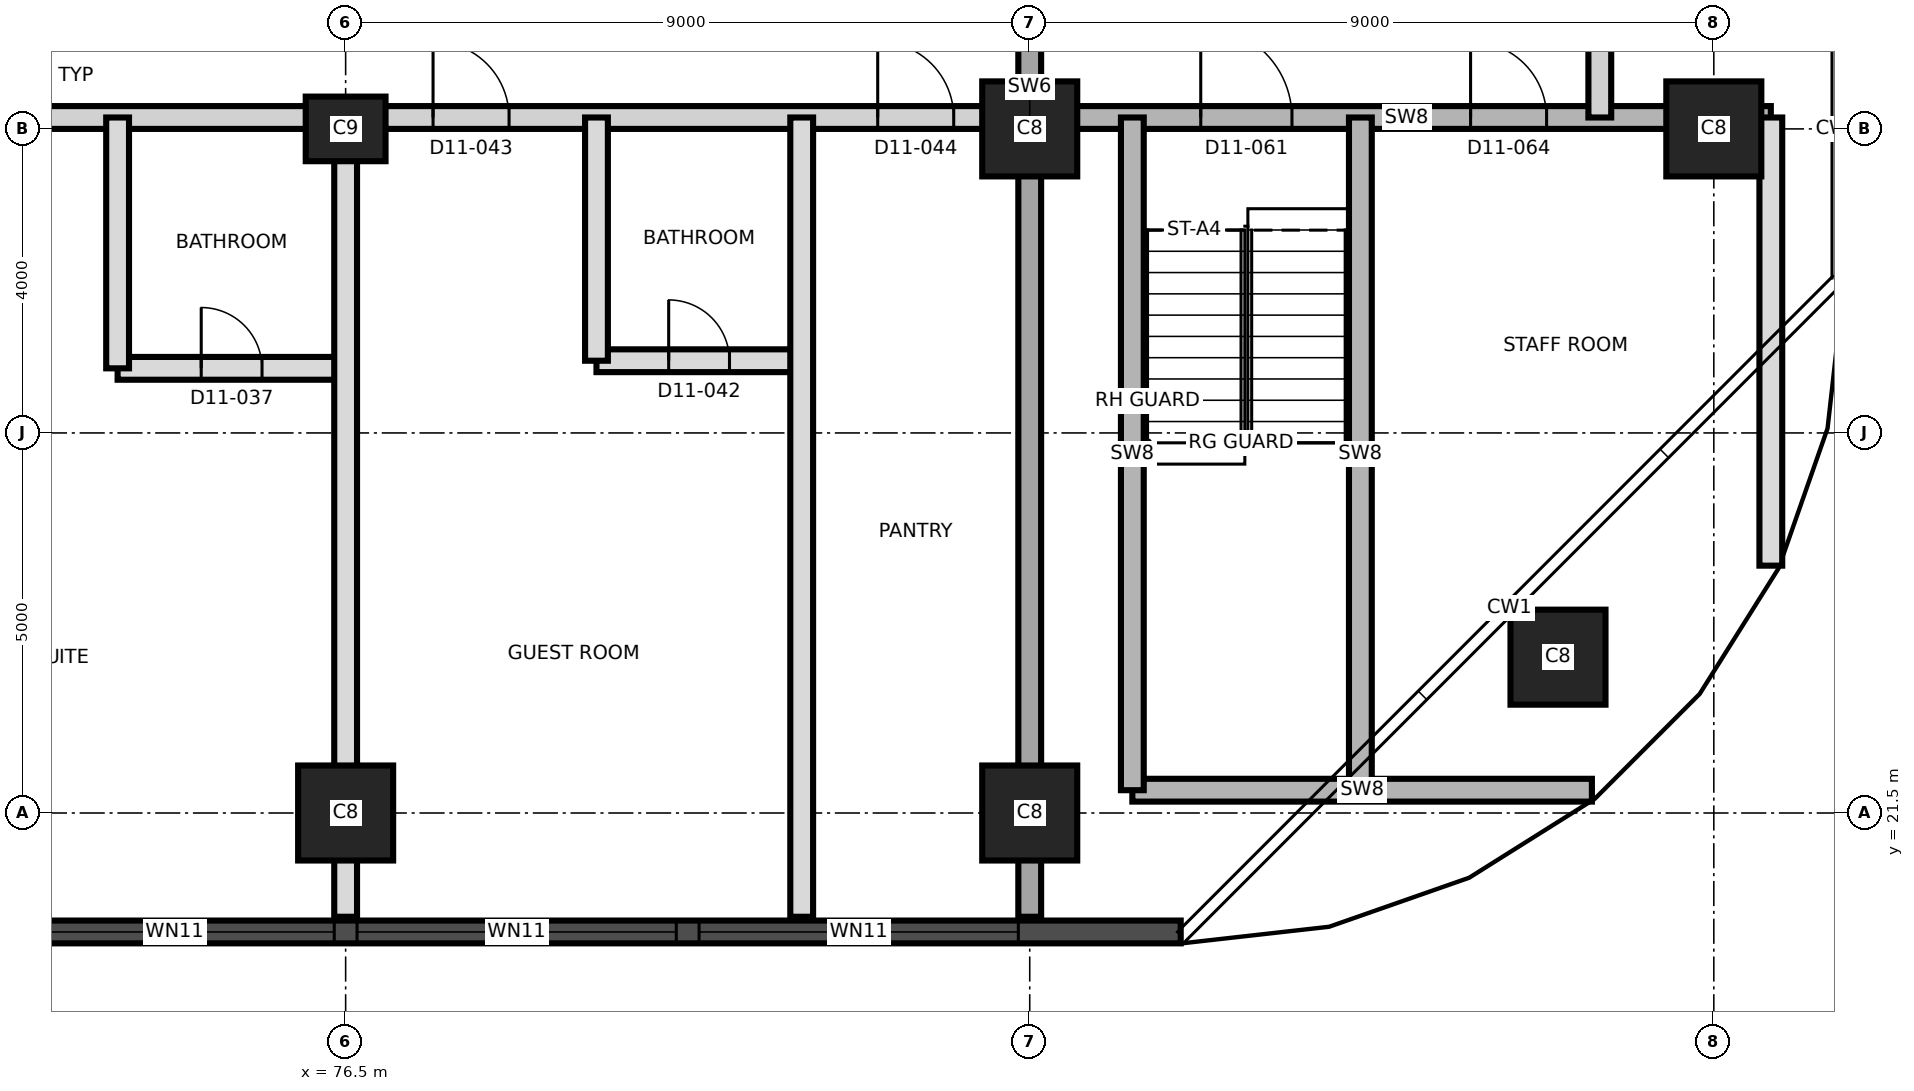
"""IFC4 building model, lengths in metres.
Left out: names, types, materials, properties, quantities, classifications, styles, units other than length and angle.
Written with IfcOpenShell. Run it as: python <this file> out.ifc"""

import sys

from ifc_helpers import new_model, si_unit, direction, frame, frame_2d, origin, origin_2d, place, context, subcontext, project, spatial, rectangle, extrude, element, fill, save


model = new_model("IFC4")
c1 = context("Model", 3, precision=1e-05, world=origin(), true_north=direction((0.0, 1.0)))
c2 = subcontext(c1, "Body", "Model", "MODEL_VIEW")
j1 = project(units=[si_unit("LENGTHUNIT", "METRE"), si_unit("PLANEANGLEUNIT", "RADIAN")], contexts=[c1])
p1 = place(None, origin())
s1 = spatial("IfcSite", under=j1, at=p1, CompositionType="ELEMENT")
p2 = place(p1, origin())
s2 = spatial("IfcBuilding", under=s1, at=p2, CompositionType="ELEMENT")
p3 = place(p2, frame((0.0, 0.0, 131.5)))
s3 = spatial("IfcBuildingStorey", under=s2, at=p3, CompositionType="ELEMENT", Elevation=131.5)
for number, where, z_axis, x_axis in (
    (1, (76.5, 21.5, 0.0), (0.0, 0.0, 1.0), (1.0, 0.0, 0.0)),
    (2, (85.5, 21.5, 0.0), (0.0, 0.0, 1.0), (1.0, 0.0, 0.0)),
    (3, (92.45, 23.55, 0.0), (0.0, 0.0, 1.0), (1.0, 0.0, 0.0)),
):
    element("IfcColumn", number, at=place(p3, frame(where, z_axis=z_axis, x_axis=x_axis)), inside=s3, PredefinedType="COLUMN", context=c2, shape_type="SweptSolid", body=[
        extrude(rectangle(XDim=1.25, YDim=1.25, at=origin_2d()), origin(), (0.0, 0.0, 1.0), 3.7),
    ])
p4 = place(p3, frame((76.5, 30.5, 0.0), z_axis=(0.0, 0.0, 1.0), x_axis=(1.0, 0.0, 0.0)))
e4 = element("IfcColumn", 4, at=p4, inside=s3, PredefinedType="COLUMN", context=c2, shape_type="SweptSolid", body=[
    extrude(rectangle(XDim=1.05, YDim=0.85, at=origin_2d()), origin(), (0.0, 0.0, 1.0), 3.7),
])
for number, where, z_axis, x_axis in (
    (5, (85.5, 30.5, 0.0), (0.0, 0.0, 1.0), (1.0, 0.0, 0.0)),
    (6, (94.5, 30.5, 0.0), (0.0, 0.0, 1.0), (1.0, 0.0, 0.0)),
):
    element("IfcColumn", number, at=place(p3, frame(where, z_axis=z_axis, x_axis=x_axis)), inside=s3, PredefinedType="COLUMN", context=c2, shape_type="SweptSolid", body=[
        extrude(rectangle(XDim=1.25, YDim=1.25, at=origin_2d()), origin(), (0.0, 0.0, 1.0), 3.7),
    ])
p5 = place(p3, frame((85.5, 20.135, 0.0), z_axis=(0.0, 0.0, 1.0), x_axis=(0.0, 1.0, 0.0)))
e7 = element("IfcWall", 7, at=p5, inside=s3, PredefinedType="SHEAR", context=c2, shape_type="SweptSolid", body=[
    extrude(rectangle(XDim=20.73, YDim=0.3, at=frame_2d((10.365, 0.0))), origin(), (0.0, 0.0, 1.0), 3.7),
])
p6 = place(p5, frame((11.565, 0.0, 0.0)))
e8 = element("IfcOpeningElement", 8, at=p6, cuts=e7, PredefinedType="OPENING", context=c2, shape_type="SweptSolid", body=[
    extrude(rectangle(XDim=1.4, YDim=2.1, at=frame_2d((0.7, 1.05))), frame((0.0, 0.16, 0.0), z_axis=(0.0, -1.0, 0.0), x_axis=(1.0, 0.0, 0.0)), (0.0, 0.0, 1.0), 0.32),
])
p7 = place(p3, frame((44.01, 19.935, 0.0), z_axis=(0.0, 0.0, 1.0), x_axis=(1.0, 0.0, 0.0)))
e9 = element("IfcWall", 9, at=p7, inside=s3, PredefinedType="SOLIDWALL", context=c2, shape_type="SweptSolid", body=[
    extrude(rectangle(XDim=43.477, YDim=0.3, at=frame_2d((21.738, 0.0))), origin(), (0.0, 0.0, 1.0), 3.4),
])
p8 = place(p7, frame((1.845, 0.0, 0.3)))
e10 = element("IfcOpeningElement", 10, at=p8, cuts=e9, PredefinedType="OPENING", context=c2, shape_type="SweptSolid", body=[
    extrude(rectangle(XDim=1.8, YDim=2.4, at=frame_2d((0.9, 1.2))), frame((0.0, 0.16, 0.0), z_axis=(0.0, -1.0, 0.0), x_axis=(1.0, 0.0, 0.0)), (0.0, 0.0, 1.0), 0.32),
])
p9 = place(p7, frame((5.64, 0.0, 0.9)))
e11 = element("IfcOpeningElement", 11, at=p9, cuts=e9, PredefinedType="OPENING", context=c2, shape_type="SweptSolid", body=[
    extrude(rectangle(XDim=4.2, YDim=1.5, at=frame_2d((2.1, 0.75))), frame((0.0, 0.16, 0.0), z_axis=(0.0, -1.0, 0.0), x_axis=(1.0, 0.0, 0.0)), (0.0, 0.0, 1.0), 0.32),
])
p10 = place(p7, frame((10.14, 0.0, 0.9)))
e12 = element("IfcOpeningElement", 12, at=p10, cuts=e9, PredefinedType="OPENING", context=c2, shape_type="SweptSolid", body=[
    extrude(rectangle(XDim=4.2, YDim=1.5, at=frame_2d((2.1, 0.75))), frame((0.0, 0.16, 0.0), z_axis=(0.0, -1.0, 0.0), x_axis=(1.0, 0.0, 0.0)), (0.0, 0.0, 1.0), 0.32),
])
p11 = place(p7, frame((14.64, 0.0, 0.9)))
e13 = element("IfcOpeningElement", 13, at=p11, cuts=e9, PredefinedType="OPENING", context=c2, shape_type="SweptSolid", body=[
    extrude(rectangle(XDim=4.2, YDim=1.5, at=frame_2d((2.1, 0.75))), frame((0.0, 0.16, 0.0), z_axis=(0.0, -1.0, 0.0), x_axis=(1.0, 0.0, 0.0)), (0.0, 0.0, 1.0), 0.32),
])
p12 = place(p7, frame((19.14, 0.0, 0.9)))
e14 = element("IfcOpeningElement", 14, at=p12, cuts=e9, PredefinedType="OPENING", context=c2, shape_type="SweptSolid", body=[
    extrude(rectangle(XDim=4.2, YDim=1.5, at=frame_2d((2.1, 0.75))), frame((0.0, 0.16, 0.0), z_axis=(0.0, -1.0, 0.0), x_axis=(1.0, 0.0, 0.0)), (0.0, 0.0, 1.0), 0.32),
])
p13 = place(p7, frame((23.64, 0.0, 0.9)))
e15 = element("IfcOpeningElement", 15, at=p13, cuts=e9, PredefinedType="OPENING", context=c2, shape_type="SweptSolid", body=[
    extrude(rectangle(XDim=4.2, YDim=1.5, at=frame_2d((2.1, 0.75))), frame((0.0, 0.16, 0.0), z_axis=(0.0, -1.0, 0.0), x_axis=(1.0, 0.0, 0.0)), (0.0, 0.0, 1.0), 0.32),
])
p14 = place(p7, frame((28.14, 0.0, 0.9)))
e16 = element("IfcOpeningElement", 16, at=p14, cuts=e9, PredefinedType="OPENING", context=c2, shape_type="SweptSolid", body=[
    extrude(rectangle(XDim=4.2, YDim=1.5, at=frame_2d((2.1, 0.75))), frame((0.0, 0.16, 0.0), z_axis=(0.0, -1.0, 0.0), x_axis=(1.0, 0.0, 0.0)), (0.0, 0.0, 1.0), 0.32),
])
p15 = place(p7, frame((32.64, 0.0, 0.9)))
e17 = element("IfcOpeningElement", 17, at=p15, cuts=e9, PredefinedType="OPENING", context=c2, shape_type="SweptSolid", body=[
    extrude(rectangle(XDim=4.2, YDim=1.5, at=frame_2d((2.1, 0.75))), frame((0.0, 0.16, 0.0), z_axis=(0.0, -1.0, 0.0), x_axis=(1.0, 0.0, 0.0)), (0.0, 0.0, 1.0), 0.32),
])
p16 = place(p7, frame((37.14, 0.0, 0.9)))
e18 = element("IfcOpeningElement", 18, at=p16, cuts=e9, PredefinedType="OPENING", context=c2, shape_type="SweptSolid", body=[
    extrude(rectangle(XDim=4.2, YDim=1.5, at=frame_2d((2.1, 0.75))), frame((0.0, 0.16, 0.0), z_axis=(0.0, -1.0, 0.0), x_axis=(1.0, 0.0, 0.0)), (0.0, 0.0, 1.0), 0.32),
])
p17 = place(p3, frame((86.85, 21.8, 0.0), z_axis=(0.0, 0.0, 1.0), x_axis=(1.0, 0.0, 0.0)))
e19 = element("IfcWall", 19, at=p17, inside=s3, PredefinedType="SHEAR", context=c2, shape_type="SweptSolid", body=[
    extrude(rectangle(XDim=6.046, YDim=0.3, at=frame_2d((3.023, 0.0))), origin(), (0.0, 0.0, 1.0), 3.4),
])
p18 = place(p3, frame((73.5, 27.35, 0.0), z_axis=(0.0, 0.0, 1.0), x_axis=(1.0, 0.0, 0.0)))
e20 = element("IfcWall", 20, at=p18, inside=s3, PredefinedType="PARTITIONING", context=c2, shape_type="SweptSolid", body=[
    extrude(rectangle(XDim=3.0, YDim=0.3, at=frame_2d((1.5, 0.0))), origin(), (0.0, 0.0, 1.0), 3.4),
])
p19 = place(p18, frame((1.1, 0.0, 0.0)))
e21 = element("IfcOpeningElement", 21, at=p19, cuts=e20, PredefinedType="OPENING", context=c2, shape_type="SweptSolid", body=[
    extrude(rectangle(XDim=0.8, YDim=2.1, at=frame_2d((0.4, 1.05))), frame((0.0, 0.16, 0.0), z_axis=(0.0, -1.0, 0.0), x_axis=(1.0, 0.0, 0.0)), (0.0, 0.0, 1.0), 0.32),
])
p20 = place(p3, frame((79.8, 27.45, 0.0), z_axis=(0.0, 0.0, 1.0), x_axis=(1.0, 0.0, 0.0)))
e22 = element("IfcWall", 22, at=p20, inside=s3, PredefinedType="PARTITIONING", context=c2, shape_type="SweptSolid", body=[
    extrude(rectangle(XDim=2.7, YDim=0.3, at=frame_2d((1.35, 0.0))), origin(), (0.0, 0.0, 1.0), 3.4),
])
p21 = place(p20, frame((0.95, 0.0, 0.0)))
e23 = element("IfcOpeningElement", 23, at=p21, cuts=e22, PredefinedType="OPENING", context=c2, shape_type="SweptSolid", body=[
    extrude(rectangle(XDim=0.8, YDim=2.1, at=frame_2d((0.4, 1.05))), frame((0.0, 0.16, 0.0), z_axis=(0.0, -1.0, 0.0), x_axis=(1.0, 0.0, 0.0)), (0.0, 0.0, 1.0), 0.32),
])
p22 = place(p3, frame((58.8, 30.65, 0.0), z_axis=(0.0, 0.0, 1.0), x_axis=(1.0, 0.0, 0.0)))
e24 = element("IfcWall", 24, at=p22, inside=s3, PredefinedType="PARTITIONING", context=c2, shape_type="SweptSolid", body=[
    extrude(rectangle(XDim=26.53, YDim=0.3, at=frame_2d((13.265, 0.0))), origin(), (0.0, 0.0, 1.0), 3.4),
])
p23 = place(p22, frame((3.115, 0.0, 0.0)))
e25 = element("IfcOpeningElement", 25, at=p23, cuts=e24, PredefinedType="OPENING", context=c2, shape_type="SweptSolid", body=[
    extrude(rectangle(XDim=1.0, YDim=2.1, at=frame_2d((0.5, 1.05))), frame((0.0, 0.16, 0.0), z_axis=(0.0, -1.0, 0.0), x_axis=(1.0, 0.0, 0.0)), (0.0, 0.0, 1.0), 0.32),
])
p24 = place(p22, frame((6.065, 0.0, 0.0)))
e26 = element("IfcOpeningElement", 26, at=p24, cuts=e24, PredefinedType="OPENING", context=c2, shape_type="SweptSolid", body=[
    extrude(rectangle(XDim=1.4, YDim=2.1, at=frame_2d((0.7, 1.05))), frame((0.0, 0.16, 0.0), z_axis=(0.0, -1.0, 0.0), x_axis=(1.0, 0.0, 0.0)), (0.0, 0.0, 1.0), 0.32),
])
p25 = place(p22, frame((12.7, 0.0, 0.0)))
e27 = element("IfcOpeningElement", 27, at=p25, cuts=e24, PredefinedType="OPENING", context=c2, shape_type="SweptSolid", body=[
    extrude(rectangle(XDim=1.0, YDim=2.4, at=frame_2d((0.5, 1.2))), frame((0.0, 0.16, 0.0), z_axis=(0.0, -1.0, 0.0), x_axis=(1.0, 0.0, 0.0)), (0.0, 0.0, 1.0), 0.32),
])
p26 = place(p22, frame((18.85, 0.0, 0.0)))
e28 = element("IfcOpeningElement", 28, at=p26, cuts=e24, PredefinedType="OPENING", context=c2, shape_type="SweptSolid", body=[
    extrude(rectangle(XDim=1.0, YDim=2.1, at=frame_2d((0.5, 1.05))), frame((0.0, 0.16, 0.0), z_axis=(0.0, -1.0, 0.0), x_axis=(1.0, 0.0, 0.0)), (0.0, 0.0, 1.0), 0.32),
])
p27 = place(p22, frame((24.7, 0.0, 0.0)))
e29 = element("IfcOpeningElement", 29, at=p27, cuts=e24, PredefinedType="OPENING", context=c2, shape_type="SweptSolid", body=[
    extrude(rectangle(XDim=1.0, YDim=2.1, at=frame_2d((0.5, 1.05))), frame((0.0, 0.16, 0.0), z_axis=(0.0, -1.0, 0.0), x_axis=(1.0, 0.0, 0.0)), (0.0, 0.0, 1.0), 0.32),
])
p28 = place(p3, frame((85.67, 30.65, 0.0), z_axis=(0.0, 0.0, 1.0), x_axis=(1.0, 0.0, 0.0)))
e30 = element("IfcWall", 30, at=p28, inside=s3, PredefinedType="SHEAR", context=c2, shape_type="SweptSolid", body=[
    extrude(rectangle(XDim=9.58, YDim=0.3, at=frame_2d((4.79, 0.0))), origin(), (0.0, 0.0, 1.0), 3.4),
])
p29 = place(p28, frame((2.08, 0.0, 0.0)))
e31 = element("IfcOpeningElement", 31, at=p29, cuts=e30, PredefinedType="OPENING", context=c2, shape_type="SweptSolid", body=[
    extrude(rectangle(XDim=1.2, YDim=2.1, at=frame_2d((0.6, 1.05))), frame((0.0, 0.16, 0.0), z_axis=(0.0, -1.0, 0.0), x_axis=(1.0, 0.0, 0.0)), (0.0, 0.0, 1.0), 0.32),
])
p30 = place(p28, frame((5.63, 0.0, 0.0)))
e32 = element("IfcOpeningElement", 32, at=p30, cuts=e30, PredefinedType="OPENING", context=c2, shape_type="SweptSolid", body=[
    extrude(rectangle(XDim=1.0, YDim=2.1, at=frame_2d((0.5, 1.05))), frame((0.0, 0.16, 0.0), z_axis=(0.0, -1.0, 0.0), x_axis=(1.0, 0.0, 0.0)), (0.0, 0.0, 1.0), 0.32),
])
p31 = place(p3, frame((73.5, 27.35, 0.0), z_axis=(0.0, 0.0, 1.0), x_axis=(0.0, 1.0, 0.0)))
e33 = element("IfcWall", 33, at=p31, inside=s3, PredefinedType="PARTITIONING", context=c2, shape_type="SweptSolid", body=[
    extrude(rectangle(XDim=3.3, YDim=0.3, at=frame_2d((1.65, 0.0))), origin(), (0.0, 0.0, 1.0), 3.4),
])
p32 = place(p3, frame((76.5, 20.135, 0.0), z_axis=(0.0, 0.0, 1.0), x_axis=(0.0, 1.0, 0.0)))
e34 = element("IfcWall", 34, at=p32, inside=s3, PredefinedType="PARTITIONING", context=c2, shape_type="SweptSolid", body=[
    extrude(rectangle(XDim=10.515, YDim=0.3, at=frame_2d((5.257, 0.0))), origin(), (0.0, 0.0, 1.0), 3.35),
])
p33 = place(p3, frame((79.8, 27.45, 0.0), z_axis=(0.0, 0.0, 1.0), x_axis=(0.0, 1.0, 0.0)))
e35 = element("IfcWall", 35, at=p33, inside=s3, PredefinedType="PARTITIONING", context=c2, shape_type="SweptSolid", body=[
    extrude(rectangle(XDim=3.2, YDim=0.3, at=frame_2d((1.6, 0.0))), origin(), (0.0, 0.0, 1.0), 3.4),
])
p34 = place(p3, frame((82.5, 20.135, 0.0), z_axis=(0.0, 0.0, 1.0), x_axis=(0.0, 1.0, 0.0)))
e36 = element("IfcWall", 36, at=p34, inside=s3, PredefinedType="PARTITIONING", context=c2, shape_type="SweptSolid", body=[
    extrude(rectangle(XDim=10.515, YDim=0.3, at=frame_2d((5.257, 0.0))), origin(), (0.0, 0.0, 1.0), 3.35),
])
for number, where, z_axis, x_axis in (
    (37, (86.85, 21.8, 0.0), (0.0, 0.0, 1.0), (0.0, 1.0, 0.0)),
    (38, (89.85, 21.8, 0.0), (0.0, 0.0, 1.0), (0.0, 1.0, 0.0)),
):
    element("IfcWall", number, at=place(p3, frame(where, z_axis=z_axis, x_axis=x_axis)), inside=s3, PredefinedType="SHEAR", context=c2, shape_type="SweptSolid", body=[
        extrude(rectangle(XDim=8.85, YDim=0.3, at=frame_2d((4.425, 0.0))), origin(), (0.0, 0.0, 1.0), 3.4),
    ])
p35 = place(p3, frame((93.0, 30.65, 0.0), z_axis=(0.0, 0.0, 1.0), x_axis=(0.0, 1.0, 0.0)))
e39 = element("IfcWall", 39, at=p35, inside=s3, PredefinedType="PARTITIONING", context=c2, shape_type="SweptSolid", body=[
    extrude(rectangle(XDim=2.7, YDim=0.3, at=frame_2d((1.35, 0.0))), origin(), (0.0, 0.0, 1.0), 3.4),
])
p36 = place(p3, frame((95.25, 24.754, 0.0), z_axis=(0.0, 0.0, 1.0), x_axis=(0.0, 1.0, 0.0)))
e40 = element("IfcWall", 40, at=p36, inside=s3, PredefinedType="PARTITIONING", context=c2, shape_type="SweptSolid", body=[
    extrude(rectangle(XDim=5.896, YDim=0.3, at=frame_2d((2.948, 0.0))), origin(), (0.0, 0.0, 1.0), 3.35),
])
p37 = place(p14, origin())
e41 = element("IfcWindow", 41, at=p37, inside=s3, PartitioningType="SINGLE_PANEL", PredefinedType="WINDOW", context=c2, shape_type="SweptSolid", body=[
    extrude(rectangle(XDim=4.2, YDim=1.5, at=frame_2d((2.1, 0.75))), frame((0.0, 0.03, 0.0), z_axis=(0.0, -1.0, 0.0), x_axis=(1.0, 0.0, 0.0)), (0.0, 0.0, 1.0), 0.06),
])
fill(e16, e41)
p38 = place(p15, origin())
e42 = element("IfcWindow", 42, at=p38, inside=s3, PartitioningType="SINGLE_PANEL", PredefinedType="WINDOW", context=c2, shape_type="SweptSolid", body=[
    extrude(rectangle(XDim=4.2, YDim=1.5, at=frame_2d((2.1, 0.75))), frame((0.0, 0.03, 0.0), z_axis=(0.0, -1.0, 0.0), x_axis=(1.0, 0.0, 0.0)), (0.0, 0.0, 1.0), 0.06),
])
fill(e17, e42)
p39 = place(p16, origin())
e43 = element("IfcWindow", 43, at=p39, inside=s3, PartitioningType="SINGLE_PANEL", PredefinedType="WINDOW", context=c2, shape_type="SweptSolid", body=[
    extrude(rectangle(XDim=4.2, YDim=1.5, at=frame_2d((2.1, 0.75))), frame((0.0, 0.03, 0.0), z_axis=(0.0, -1.0, 0.0), x_axis=(1.0, 0.0, 0.0)), (0.0, 0.0, 1.0), 0.06),
])
fill(e18, e43)
p40 = place(p19, origin())
e44 = element("IfcDoor", 44, at=p40, inside=s3, OperationType="SINGLE_SWING_RIGHT", PredefinedType="DOOR", context=c2, shape_type="SweptSolid", body=[
    extrude(rectangle(XDim=0.8, YDim=2.1, at=frame_2d((0.4, 1.05))), frame((0.0, 0.025, 0.0), z_axis=(0.0, -1.0, 0.0), x_axis=(1.0, 0.0, 0.0)), (0.0, 0.0, 1.0), 0.05),
])
fill(e21, e44)
p41 = place(p21, origin())
e45 = element("IfcDoor", 45, at=p41, inside=s3, OperationType="SINGLE_SWING_LEFT", PredefinedType="DOOR", context=c2, shape_type="SweptSolid", body=[
    extrude(rectangle(XDim=0.8, YDim=2.1, at=frame_2d((0.4, 1.05))), frame((0.0, 0.025, 0.0), z_axis=(0.0, -1.0, 0.0), x_axis=(1.0, 0.0, 0.0)), (0.0, 0.0, 1.0), 0.05),
])
fill(e23, e45)
p42 = place(p26, origin())
e46 = element("IfcDoor", 46, at=p42, inside=s3, OperationType="SINGLE_SWING_LEFT", PredefinedType="DOOR", context=c2, shape_type="SweptSolid", body=[
    extrude(rectangle(XDim=1.0, YDim=2.1, at=frame_2d((0.5, 1.05))), frame((0.0, 0.025, 0.0), z_axis=(0.0, -1.0, 0.0), x_axis=(1.0, 0.0, 0.0)), (0.0, 0.0, 1.0), 0.05),
])
fill(e28, e46)
p43 = place(p27, origin())
e47 = element("IfcDoor", 47, at=p43, inside=s3, OperationType="SINGLE_SWING_RIGHT", PredefinedType="DOOR", context=c2, shape_type="SweptSolid", body=[
    extrude(rectangle(XDim=1.0, YDim=2.1, at=frame_2d((0.5, 1.05))), frame((0.0, 0.025, 0.0), z_axis=(0.0, -1.0, 0.0), x_axis=(1.0, 0.0, 0.0)), (0.0, 0.0, 1.0), 0.05),
])
fill(e29, e47)
p44 = place(p29, origin())
e48 = element("IfcDoor", 48, at=p44, inside=s3, OperationType="SINGLE_SWING_LEFT", PredefinedType="DOOR", context=c2, shape_type="SweptSolid", body=[
    extrude(rectangle(XDim=1.2, YDim=2.1, at=frame_2d((0.6, 1.05))), frame((0.0, 0.025, 0.0), z_axis=(0.0, -1.0, 0.0), x_axis=(1.0, 0.0, 0.0)), (0.0, 0.0, 1.0), 0.05),
])
fill(e31, e48)
p45 = place(p30, origin())
e49 = element("IfcDoor", 49, at=p45, inside=s3, OperationType="SINGLE_SWING_LEFT", PredefinedType="DOOR", context=c2, shape_type="SweptSolid", body=[
    extrude(rectangle(XDim=1.0, YDim=2.1, at=frame_2d((0.5, 1.05))), frame((0.0, 0.025, 0.0), z_axis=(0.0, -1.0, 0.0), x_axis=(1.0, 0.0, 0.0)), (0.0, 0.0, 1.0), 0.05),
])
fill(e32, e49)
save(model, sys.argv[1])
